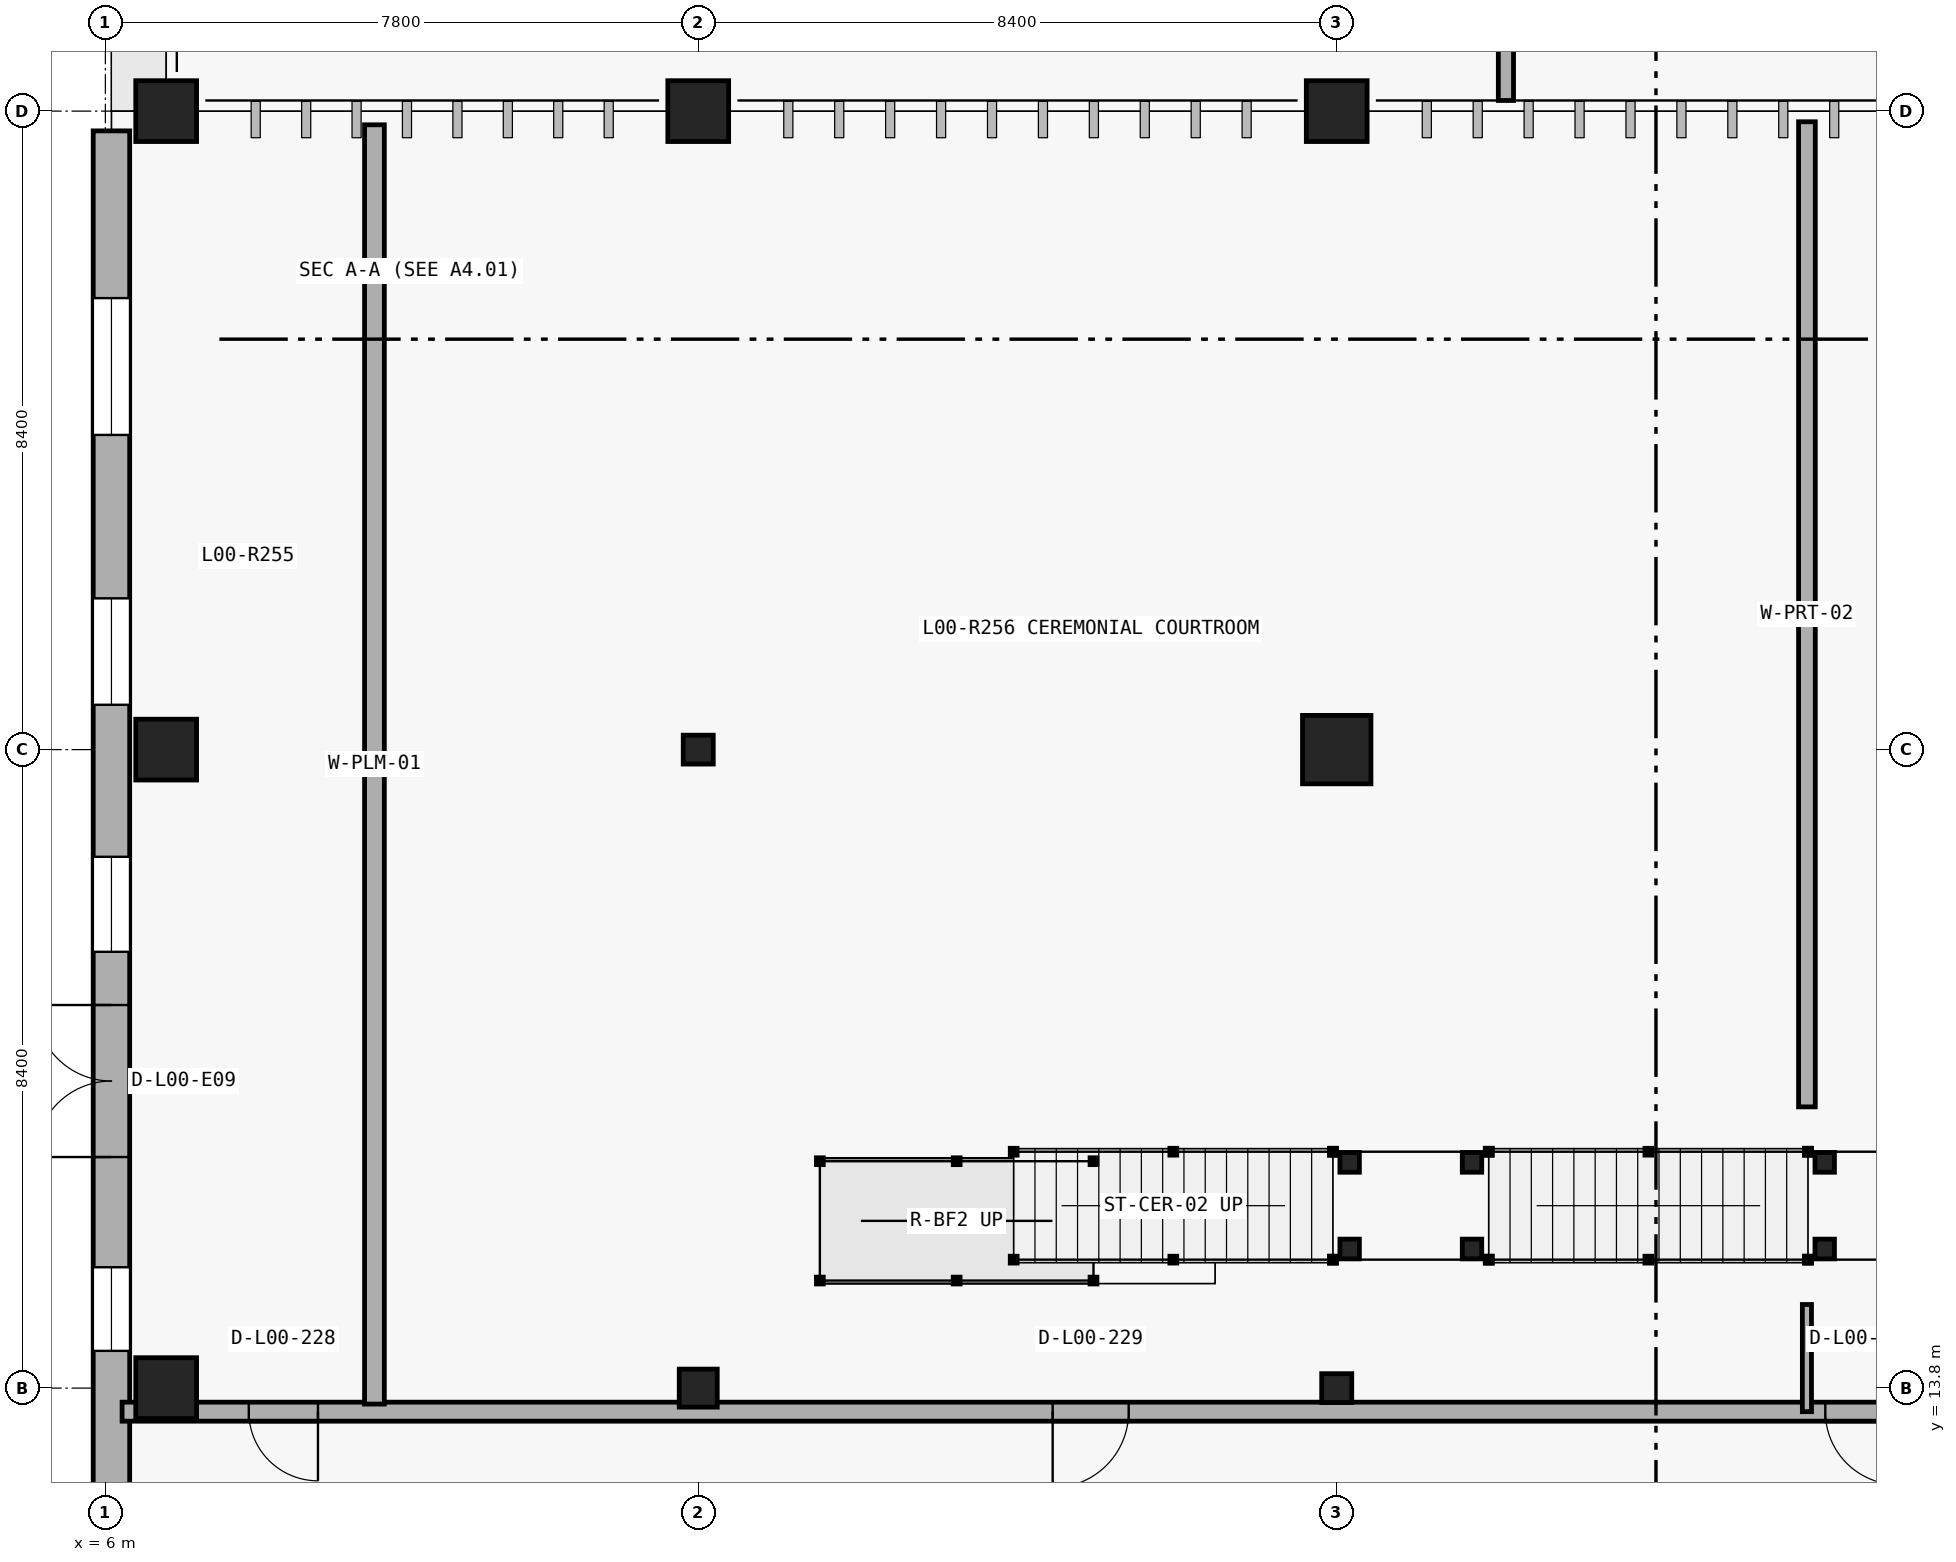
"""IFC4 building model, lengths in metres.
Left out: names, types, materials, properties, quantities, classifications, styles, units other than length and angle.
Written with IfcOpenShell. Run it as: python <this file> out.ifc"""

import sys

from ifc_helpers import new_model, si_unit, direction, frame, frame_2d, origin_with_axes, origin_2d_with_axis, place, context, subcontext, project, spatial, rectangle, circle, i_section, extrude, element, fill, save


model = new_model("IFC4")
c1 = context("Model", 3, precision=1e-05, world=origin_with_axes(), true_north=direction((0.0, 1.0)))
c2 = subcontext(c1, "Body", "Model", "MODEL_VIEW")
j1 = project(units=[si_unit("LENGTHUNIT", "METRE"), si_unit("PLANEANGLEUNIT", "RADIAN")], contexts=[c1])
p1 = place(None, origin_with_axes())
s1 = spatial("IfcSite", under=j1, at=p1, CompositionType="ELEMENT")
p2 = place(p1, origin_with_axes())
s2 = spatial("IfcBuilding", under=s1, at=p2, CompositionType="ELEMENT")
p3 = place(p2, origin_with_axes())
s3 = spatial("IfcBuildingStorey", under=s2, at=p3, CompositionType="ELEMENT", Elevation=0.0)
p4 = place(None, frame((6.08, 30.34, 0.0), z_axis=(0.0, 0.0, 1.0), x_axis=(0.0, -1.0, 0.0)))
e1 = element("IfcWall", 1, at=p4, inside=s3, PredefinedType="SOLIDWALL", context=c2, shape_type="SweptSolid", body=[
    extrude(rectangle(XDim=24.0, YDim=0.48, at=frame_2d((12.0, 0.0), x_axis=(1.0, 0.0))), origin_with_axes(), (0.0, 0.0, 1.0), 5.1),
])
p5 = place(None, frame((6.08, 17.84, 0.0), z_axis=(0.0, 0.0, 1.0), x_axis=(0.0, -1.0, 0.0)))
e2 = element("IfcOpeningElement", 2, at=p5, cuts=e1, PredefinedType="OPENING", context=c2, shape_type="SweptSolid", body=[
    extrude(rectangle(XDim=2.0, YDim=2.5, at=frame_2d((0.0, 1.25), x_axis=(1.0, 0.0))), frame((0.0, 0.25, 0.0), z_axis=(0.0, -1.0, 0.0), x_axis=(1.0, 0.0, 0.0)), (0.0, 0.0, 1.0), 0.5),
])
p6 = place(None, frame((6.08, 27.24, 2.75), z_axis=(0.0, 0.0, 1.0), x_axis=(0.0, -1.0, 0.0)))
e3 = element("IfcOpeningElement", 3, at=p6, cuts=e1, PredefinedType="OPENING", context=c2, shape_type="SweptSolid", body=[
    extrude(rectangle(XDim=1.8, YDim=1.2, at=frame_2d((0.0, 0.6), x_axis=(1.0, 0.0))), frame((0.0, 0.25, 0.0), z_axis=(0.0, -1.0, 0.0), x_axis=(1.0, 0.0, 0.0)), (0.0, 0.0, 1.0), 0.5),
])
p7 = place(None, frame((6.08, 23.49, 0.9), z_axis=(0.0, 0.0, 1.0), x_axis=(0.0, -1.0, 0.0)))
e4 = element("IfcOpeningElement", 4, at=p7, cuts=e1, PredefinedType="OPENING", context=c2, shape_type="SweptSolid", body=[
    extrude(rectangle(XDim=1.4, YDim=2.2, at=frame_2d((0.0, 1.1), x_axis=(1.0, 0.0))), frame((0.0, 0.25, 0.0), z_axis=(0.0, -1.0, 0.0), x_axis=(1.0, 0.0, 0.0)), (0.0, 0.0, 1.0), 0.5),
])
p8 = place(None, frame((6.08, 20.165, 0.9), z_axis=(0.0, 0.0, 1.0), x_axis=(0.0, -1.0, 0.0)))
e5 = element("IfcOpeningElement", 5, at=p8, cuts=e1, PredefinedType="OPENING", context=c2, shape_type="SweptSolid", body=[
    extrude(rectangle(XDim=1.25, YDim=2.1, at=frame_2d((0.0, 1.05), x_axis=(1.0, 0.0))), frame((0.0, 0.25, 0.0), z_axis=(0.0, -1.0, 0.0), x_axis=(1.0, 0.0, 0.0)), (0.0, 0.0, 1.0), 0.5),
])
p9 = place(None, frame((6.08, 14.84, 0.95), z_axis=(0.0, 0.0, 1.0), x_axis=(0.0, -1.0, 0.0)))
e6 = element("IfcOpeningElement", 6, at=p9, cuts=e1, PredefinedType="OPENING", context=c2, shape_type="SweptSolid", body=[
    extrude(rectangle(XDim=1.1, YDim=2.0, at=frame_2d((0.0, 1.0), x_axis=(1.0, 0.0))), frame((0.0, 0.25, 0.0), z_axis=(0.0, -1.0, 0.0), x_axis=(1.0, 0.0, 0.0)), (0.0, 0.0, 1.0), 0.5),
])
p10 = place(None, frame((6.22, 13.49, 0.0), z_axis=(0.0, 0.0, 1.0), x_axis=(1.0, 0.0, 0.0)))
e7 = element("IfcWall", 7, at=p10, inside=s3, PredefinedType="PARTITIONING", context=c2, shape_type="SweptSolid", body=[
    extrude(rectangle(XDim=25.312, YDim=0.25, at=frame_2d((12.656, 0.0), x_axis=(1.0, 0.0))), origin_with_axes(), (0.0, 0.0, 1.0), 4.15),
])
p11 = place(None, frame((8.342, 13.49, 0.0), z_axis=(0.0, 0.0, 1.0), x_axis=(1.0, 0.0, 0.0)))
e8 = element("IfcOpeningElement", 8, at=p11, cuts=e7, PredefinedType="OPENING", context=c2, shape_type="SweptSolid", body=[
    extrude(rectangle(XDim=0.91, YDim=2.12, at=frame_2d((0.0, 1.06), x_axis=(1.0, 0.0))), frame((0.0, 0.135, 0.0), z_axis=(0.0, -1.0, 0.0), x_axis=(1.0, 0.0, 0.0)), (0.0, 0.0, 1.0), 0.27),
])
p12 = place(None, frame((18.963, 13.49, 0.0), z_axis=(0.0, 0.0, 1.0), x_axis=(1.0, 0.0, 0.0)))
e9 = element("IfcOpeningElement", 9, at=p12, cuts=e7, PredefinedType="OPENING", context=c2, shape_type="SweptSolid", body=[
    extrude(rectangle(XDim=1.0, YDim=2.28, at=frame_2d((0.0, 1.14), x_axis=(1.0, 0.0))), frame((0.0, 0.135, 0.0), z_axis=(0.0, -1.0, 0.0), x_axis=(1.0, 0.0, 0.0)), (0.0, 0.0, 1.0), 0.27),
])
p13 = place(None, frame((29.108, 13.49, 0.0), z_axis=(0.0, 0.0, 1.0), x_axis=(1.0, 0.0, 0.0)))
e10 = element("IfcOpeningElement", 10, at=p13, cuts=e7, PredefinedType="OPENING", context=c2, shape_type="SweptSolid", body=[
    extrude(rectangle(XDim=0.96, YDim=2.2, at=frame_2d((0.0, 1.1), x_axis=(1.0, 0.0))), frame((0.0, 0.135, 0.0), z_axis=(0.0, -1.0, 0.0), x_axis=(1.0, 0.0, 0.0)), (0.0, 0.0, 1.0), 0.27),
])
p14 = place(None, frame((9.54, 13.59, 0.0), z_axis=(0.0, 0.0, 1.0), x_axis=(0.0, 1.0, 0.0)))
e11 = element("IfcWall", 11, at=p14, inside=s3, PredefinedType="PLUMBINGWALL", context=c2, shape_type="SweptSolid", body=[
    extrude(rectangle(XDim=16.83, YDim=0.26, at=frame_2d((8.415, 0.0), x_axis=(1.0, 0.0))), origin_with_axes(), (0.0, 0.0, 1.0), 5.08),
])
p15 = place(None, frame((28.386, 13.49, 0.0), z_axis=(0.0, 0.0, 1.0), x_axis=(0.0, 1.0, 0.0)))
e12 = element("IfcWall", 12, at=p15, inside=s3, PredefinedType="PARTITIONING", context=c2, shape_type="SweptSolid", body=[
    extrude(rectangle(XDim=1.41, YDim=0.12, at=frame_2d((0.705, 0.0), x_axis=(1.0, 0.0))), origin_with_axes(), (0.0, 0.0, 1.0), 5.08),
])
p16 = place(None, frame((28.386, 17.5, 0.0), z_axis=(0.0, 0.0, 1.0), x_axis=(0.0, 1.0, 0.0)))
e13 = element("IfcWall", 13, at=p16, inside=s3, PredefinedType="PARTITIONING", context=c2, shape_type="SweptSolid", body=[
    extrude(rectangle(XDim=12.96, YDim=0.22, at=frame_2d((6.48, 0.0), x_axis=(1.0, 0.0))), origin_with_axes(), (0.0, 0.0, 1.0), 5.08),
])
p17 = place(None, frame((24.426, 30.74, 0.0), z_axis=(0.0, 0.0, 1.0), x_axis=(0.0, 1.0, 0.0)))
e14 = element("IfcWall", 14, at=p17, inside=s3, PredefinedType="PARTITIONING", context=c2, shape_type="SweptSolid", body=[
    extrude(rectangle(XDim=11.57, YDim=0.2, at=frame_2d((5.785, 0.0), x_axis=(1.0, 0.0))), origin_with_axes(), (0.0, 0.0, 1.0), 5.08),
])
for number, where, z_axis, x_axis in (
    (15, (6.8, 13.8, 0.0), (0.0, 0.0, 1.0), (1.0, 0.0, 0.0)),
    (16, (6.8, 22.2, 0.0), (0.0, 0.0, 1.0), (1.0, 0.0, 0.0)),
    (17, (6.8, 30.6, 0.0), (0.0, 0.0, 1.0), (1.0, 0.0, 0.0)),
):
    element("IfcColumn", number, at=place(None, frame(where, z_axis=z_axis, x_axis=x_axis)), inside=s3, PredefinedType="COLUMN", context=c2, shape_type="SweptSolid", body=[
        extrude(circle(Radius=0.4, at=origin_2d_with_axis()), origin_with_axes(), (0.0, 0.0, 1.0), 5.4),
    ])
p18 = place(None, frame((13.8, 13.8, 0.0), z_axis=(0.0, 0.0, 1.0), x_axis=(1.0, 0.0, 0.0)))
e18 = element("IfcColumn", 18, at=p18, inside=s3, PredefinedType="COLUMN", context=c2, shape_type="SweptSolid", body=[
    extrude(i_section(OverallWidth=0.5, OverallDepth=0.5, WebThickness=0.022, FlangeThickness=0.036, at=origin_2d_with_axis()), origin_with_axes(), (0.0, 0.0, 1.0), 5.4),
])
p19 = place(None, frame((13.8, 22.2, 0.0), z_axis=(0.0, 0.0, 1.0), x_axis=(1.0, 0.0, 0.0)))
e19 = element("IfcColumn", 19, at=p19, inside=s3, PredefinedType="COLUMN", context=c2, shape_type="SweptSolid", body=[
    extrude(i_section(OverallWidth=0.395, OverallDepth=0.38, WebThickness=0.019, FlangeThickness=0.03, at=origin_2d_with_axis()), origin_with_axes(), (0.0, 0.0, 1.0), 5.4),
])
p20 = place(None, frame((13.8, 30.6, 0.0), z_axis=(0.0, 0.0, 1.0), x_axis=(1.0, 0.0, 0.0)))
e20 = element("IfcColumn", 20, at=p20, inside=s3, PredefinedType="COLUMN", context=c2, shape_type="SweptSolid", body=[
    extrude(circle(Radius=0.4, at=origin_2d_with_axis()), origin_with_axes(), (0.0, 0.0, 1.0), 5.4),
])
p21 = place(None, frame((22.2, 13.8, 0.0), z_axis=(0.0, 0.0, 1.0), x_axis=(1.0, 0.0, 0.0)))
e21 = element("IfcColumn", 21, at=p21, inside=s3, PredefinedType="COLUMN", context=c2, shape_type="SweptSolid", body=[
    extrude(i_section(OverallWidth=0.395, OverallDepth=0.38, WebThickness=0.019, FlangeThickness=0.03, at=origin_2d_with_axis()), origin_with_axes(), (0.0, 0.0, 1.0), 5.4),
])
p22 = place(None, frame((22.2, 22.2, 0.0), z_axis=(0.0, 0.0, 1.0), x_axis=(1.0, 0.0, 0.0)))
e22 = element("IfcColumn", 22, at=p22, inside=s3, PredefinedType="COLUMN", context=c2, shape_type="SweptSolid", body=[
    extrude(rectangle(XDim=0.9, YDim=0.9, at=origin_2d_with_axis()), origin_with_axes(), (0.0, 0.0, 1.0), 5.4),
])
p23 = place(None, frame((22.2, 30.6, 0.0), z_axis=(0.0, 0.0, 1.0), x_axis=(1.0, 0.0, 0.0)))
e23 = element("IfcColumn", 23, at=p23, inside=s3, PredefinedType="COLUMN", context=c2, shape_type="SweptSolid", body=[
    extrude(circle(Radius=0.4, at=origin_2d_with_axis()), origin_with_axes(), (0.0, 0.0, 1.0), 5.4),
])
for number, where, z_axis, x_axis in (
    (24, (22.37, 15.63, -0.28), (0.0, 0.0, 1.0), (1.0, 0.0, 0.0)),
    (25, (22.37, 16.77, -0.28), (0.0, 0.0, 1.0), (1.0, 0.0, 0.0)),
    (26, (23.98, 15.63, -0.28), (0.0, 0.0, 1.0), (1.0, 0.0, 0.0)),
    (27, (23.98, 16.77, -0.28), (0.0, 0.0, 1.0), (1.0, 0.0, 0.0)),
):
    element("IfcColumn", number, at=place(None, frame(where, z_axis=z_axis, x_axis=x_axis)), inside=s3, PredefinedType="COLUMN", context=c2, shape_type="SweptSolid", body=[
        extrude(i_section(OverallWidth=0.256, OverallDepth=0.26, WebThickness=0.011, FlangeThickness=0.017, at=origin_2d_with_axis()), origin_with_axes(), (0.0, 0.0, 1.0), 2.8),
    ])
for number, where, z_axis, x_axis in (
    (28, (28.62, 15.63, -0.28), (0.0, 0.0, 1.0), (1.0, 0.0, 0.0)),
    (29, (28.62, 16.77, -0.28), (0.0, 0.0, 1.0), (1.0, 0.0, 0.0)),
):
    element("IfcColumn", number, at=place(None, frame(where, z_axis=z_axis, x_axis=x_axis)), inside=s3, PredefinedType="COLUMN", context=c2, shape_type="SweptSolid", body=[
        extrude(i_section(OverallWidth=0.256, OverallDepth=0.26, WebThickness=0.011, FlangeThickness=0.017, at=origin_2d_with_axis()), origin_with_axes(), (0.0, 0.0, 1.0), 5.5),
    ])
p24 = place(None, frame((6.08, 17.84, 0.0), z_axis=(0.0, 0.0, 1.0), x_axis=(0.0, 1.0, 0.0)))
e30 = element("IfcDoor", 30, at=p24, inside=s3, OperationType="DOUBLE_DOOR_SINGLE_SWING", PredefinedType="DOOR", context=c2, shape_type="SweptSolid", body=[
    extrude(rectangle(XDim=2.0, YDim=2.5, at=frame_2d((0.0, 1.25), x_axis=(1.0, 0.0))), frame((0.0, 0.04, 0.0), z_axis=(0.0, -1.0, 0.0), x_axis=(1.0, 0.0, 0.0)), (0.0, 0.0, 1.0), 0.08),
])
fill(e2, e30)
p25 = place(None, frame((8.342, 13.49, 0.0), z_axis=(0.0, 0.0, 1.0), x_axis=(-1.0, 0.0, 0.0)))
e31 = element("IfcDoor", 31, at=p25, inside=s3, OperationType="SINGLE_SWING_RIGHT", PredefinedType="DOOR", context=c2, shape_type="SweptSolid", body=[
    extrude(rectangle(XDim=0.91, YDim=2.12, at=frame_2d((0.0, 1.06), x_axis=(1.0, 0.0))), frame((0.0, 0.04, 0.0), z_axis=(0.0, -1.0, 0.0), x_axis=(1.0, 0.0, 0.0)), (0.0, 0.0, 1.0), 0.08),
])
fill(e8, e31)
p26 = place(None, frame((18.963, 13.49, 0.0), z_axis=(0.0, 0.0, 1.0), x_axis=(-1.0, 0.0, 0.0)))
e32 = element("IfcDoor", 32, at=p26, inside=s3, OperationType="SINGLE_SWING_LEFT", PredefinedType="DOOR", context=c2, shape_type="SweptSolid", body=[
    extrude(rectangle(XDim=1.0, YDim=2.28, at=frame_2d((0.0, 1.14), x_axis=(1.0, 0.0))), frame((0.0, 0.04, 0.0), z_axis=(0.0, -1.0, 0.0), x_axis=(1.0, 0.0, 0.0)), (0.0, 0.0, 1.0), 0.08),
])
fill(e9, e32)
p27 = place(None, frame((29.108, 13.49, 0.0), z_axis=(0.0, 0.0, 1.0), x_axis=(-1.0, 0.0, 0.0)))
e33 = element("IfcDoor", 33, at=p27, inside=s3, OperationType="SINGLE_SWING_RIGHT", PredefinedType="DOOR", context=c2, shape_type="SweptSolid", body=[
    extrude(rectangle(XDim=0.96, YDim=2.2, at=frame_2d((0.0, 1.1), x_axis=(1.0, 0.0))), frame((0.0, 0.04, 0.0), z_axis=(0.0, -1.0, 0.0), x_axis=(1.0, 0.0, 0.0)), (0.0, 0.0, 1.0), 0.08),
])
fill(e10, e33)
p28 = place(None, frame((6.08, 27.24, 2.75), z_axis=(0.0, 0.0, 1.0), x_axis=(0.0, -1.0, 0.0)))
e34 = element("IfcWindow", 34, at=p28, inside=s3, PartitioningType="SINGLE_PANEL", PredefinedType="WINDOW", context=c2, shape_type="SweptSolid", body=[
    extrude(rectangle(XDim=1.8, YDim=1.2, at=frame_2d((0.0, 0.6), x_axis=(1.0, 0.0))), frame((0.0, 0.03, 0.0), z_axis=(0.0, -1.0, 0.0), x_axis=(1.0, 0.0, 0.0)), (0.0, 0.0, 1.0), 0.06),
])
fill(e3, e34)
p29 = place(None, frame((6.08, 23.49, 0.9), z_axis=(0.0, 0.0, 1.0), x_axis=(0.0, -1.0, 0.0)))
e35 = element("IfcWindow", 35, at=p29, inside=s3, PartitioningType="SINGLE_PANEL", PredefinedType="WINDOW", context=c2, shape_type="SweptSolid", body=[
    extrude(rectangle(XDim=1.4, YDim=2.2, at=frame_2d((0.0, 1.1), x_axis=(1.0, 0.0))), frame((0.0, 0.03, 0.0), z_axis=(0.0, -1.0, 0.0), x_axis=(1.0, 0.0, 0.0)), (0.0, 0.0, 1.0), 0.06),
])
fill(e4, e35)
p30 = place(None, frame((6.08, 20.165, 0.9), z_axis=(0.0, 0.0, 1.0), x_axis=(0.0, -1.0, 0.0)))
e36 = element("IfcWindow", 36, at=p30, inside=s3, PartitioningType="SINGLE_PANEL", PredefinedType="WINDOW", context=c2, shape_type="SweptSolid", body=[
    extrude(rectangle(XDim=1.25, YDim=2.1, at=frame_2d((0.0, 1.05), x_axis=(1.0, 0.0))), frame((0.0, 0.03, 0.0), z_axis=(0.0, -1.0, 0.0), x_axis=(1.0, 0.0, 0.0)), (0.0, 0.0, 1.0), 0.06),
])
fill(e5, e36)
p31 = place(None, frame((6.08, 14.84, 0.95), z_axis=(0.0, 0.0, 1.0), x_axis=(0.0, -1.0, 0.0)))
e37 = element("IfcWindow", 37, at=p31, inside=s3, PartitioningType="SINGLE_PANEL", PredefinedType="WINDOW", context=c2, shape_type="SweptSolid", body=[
    extrude(rectangle(XDim=1.1, YDim=2.0, at=frame_2d((0.0, 1.0), x_axis=(1.0, 0.0))), frame((0.0, 0.03, 0.0), z_axis=(0.0, -1.0, 0.0), x_axis=(1.0, 0.0, 0.0)), (0.0, 0.0, 1.0), 0.06),
])
fill(e6, e37)
save(model, sys.argv[1])
